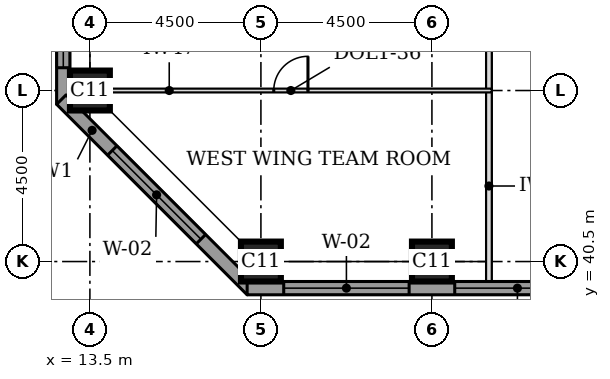
"""IFC4 building model, lengths in metres.
Left out: names, types, materials, properties, quantities, classifications, styles, units other than length and angle.
Written with IfcOpenShell. Run it as: python <this file> out.ifc"""

import sys

from ifc_helpers import new_model, si_unit, direction, frame, frame_2d, origin, origin_2d, place, context, subcontext, project, spatial, rectangle, extrude, element, fill, save


model = new_model("IFC4")
c1 = context("Model", 3, precision=1e-05, world=origin(), true_north=direction((0.0, 1.0)))
c2 = subcontext(c1, "Body", "Model", "MODEL_VIEW")
j1 = project(units=[si_unit("LENGTHUNIT", "METRE"), si_unit("PLANEANGLEUNIT", "RADIAN")], contexts=[c1])
p1 = place(None, origin())
s1 = spatial("IfcSite", under=j1, at=p1, CompositionType="ELEMENT")
p2 = place(p1, origin())
s2 = spatial("IfcBuilding", under=s1, at=p2, CompositionType="ELEMENT")
p3 = place(p2, frame((0.0, 0.0, 78.9)))
s3 = spatial("IfcBuildingStorey", under=s2, at=p3, CompositionType="ELEMENT", Elevation=78.9)
for number, where, z_axis, x_axis in (
    (1, (18.0, 40.5, 0.0), (0.0, 0.0, 1.0), (1.0, 0.0, 0.0)),
    (2, (22.5, 40.5, 0.0), (0.0, 0.0, 1.0), (1.0, 0.0, 0.0)),
    (3, (13.5, 45.0, 0.0), (0.0, 0.0, 1.0), (1.0, 0.0, 0.0)),
):
    element("IfcColumn", number, at=place(p3, frame(where, z_axis=z_axis, x_axis=x_axis)), inside=s3, PredefinedType="COLUMN", context=c2, shape_type="SweptSolid", body=[
        extrude(rectangle(XDim=1.05, YDim=1.05, at=origin_2d()), origin(), (0.0, 0.0, 1.0), 3.7),
    ])
p4 = place(p3, frame((12.8, 58.862, 0.0), z_axis=(0.0, 0.0, 1.0), x_axis=(0.0, -1.0, 0.0)))
e4 = element("IfcWall", 4, at=p4, inside=s3, PredefinedType="STANDARD", context=c2, shape_type="SweptSolid", body=[
    extrude(rectangle(XDim=14.225, YDim=0.35, at=frame_2d((7.112, 0.0))), origin(), (0.0, 0.0, 1.0), 3.525),
])
p5 = place(p4, frame((0.962, 0.0, 0.9)))
e5 = element("IfcOpeningElement", 5, at=p5, cuts=e4, PredefinedType="OPENING", context=c2, shape_type="SweptSolid", body=[
    extrude(rectangle(XDim=3.3, YDim=1.9, at=frame_2d((1.65, 0.95))), frame((0.0, 0.185, 0.0), z_axis=(0.0, -1.0, 0.0), x_axis=(1.0, 0.0, 0.0)), (0.0, 0.0, 1.0), 0.37),
])
p6 = place(p4, frame((5.462, 0.0, 0.9)))
e6 = element("IfcOpeningElement", 6, at=p6, cuts=e4, PredefinedType="OPENING", context=c2, shape_type="SweptSolid", body=[
    extrude(rectangle(XDim=3.3, YDim=1.9, at=frame_2d((1.65, 0.95))), frame((0.0, 0.185, 0.0), z_axis=(0.0, -1.0, 0.0), x_axis=(1.0, 0.0, 0.0)), (0.0, 0.0, 1.0), 0.37),
])
p7 = place(p4, frame((9.962, 0.0, 0.9)))
e7 = element("IfcOpeningElement", 7, at=p7, cuts=e4, PredefinedType="OPENING", context=c2, shape_type="SweptSolid", body=[
    extrude(rectangle(XDim=3.3, YDim=1.9, at=frame_2d((1.65, 0.95))), frame((0.0, 0.185, 0.0), z_axis=(0.0, -1.0, 0.0), x_axis=(1.0, 0.0, 0.0)), (0.0, 0.0, 1.0), 0.37),
])
p8 = place(p3, frame((12.749, 44.761, 0.0), z_axis=(0.0, 0.0, 1.0), x_axis=(0.707106781187, -0.707106781187, 0.0)))
e8 = element("IfcWall", 8, at=p8, inside=s3, PredefinedType="STANDARD", context=c2, shape_type="SweptSolid", body=[
    extrude(rectangle(XDim=7.089, YDim=0.35, at=frame_2d((3.544, 0.0))), origin(), (0.0, 0.0, 1.0), 3.525),
])
p9 = place(p8, frame((1.894, 0.0, 0.9)))
e9 = element("IfcOpeningElement", 9, at=p9, cuts=e8, PredefinedType="OPENING", context=c2, shape_type="SweptSolid", body=[
    extrude(rectangle(XDim=3.3, YDim=1.9, at=frame_2d((1.65, 0.95))), frame((0.0, 0.185, 0.0), z_axis=(0.0, -1.0, 0.0), x_axis=(1.0, 0.0, 0.0)), (0.0, 0.0, 1.0), 0.37),
])
p10 = place(p3, frame((17.638, 39.8, 0.0), z_axis=(0.0, 0.0, 1.0), x_axis=(1.0, 0.0, 0.0)))
e10 = element("IfcWall", 10, at=p10, inside=s3, PredefinedType="STANDARD", context=c2, shape_type="SweptSolid", body=[
    extrude(rectangle(XDim=17.837, YDim=0.35, at=frame_2d((8.919, 0.0))), origin(), (0.0, 0.0, 1.0), 3.525),
])
p11 = place(p10, frame((0.962, 0.0, 0.9)))
e11 = element("IfcOpeningElement", 11, at=p11, cuts=e10, PredefinedType="OPENING", context=c2, shape_type="SweptSolid", body=[
    extrude(rectangle(XDim=3.3, YDim=1.9, at=frame_2d((1.65, 0.95))), frame((0.0, 0.185, 0.0), z_axis=(0.0, -1.0, 0.0), x_axis=(1.0, 0.0, 0.0)), (0.0, 0.0, 1.0), 0.37),
])
p12 = place(p10, frame((5.462, 0.0, 0.9)))
e12 = element("IfcOpeningElement", 12, at=p12, cuts=e10, PredefinedType="OPENING", context=c2, shape_type="SweptSolid", body=[
    extrude(rectangle(XDim=3.3, YDim=1.9, at=frame_2d((1.65, 0.95))), frame((0.0, 0.185, 0.0), z_axis=(0.0, -1.0, 0.0), x_axis=(1.0, 0.0, 0.0)), (0.0, 0.0, 1.0), 0.37),
])
p13 = place(p10, frame((9.962, 0.0, 0.9)))
e13 = element("IfcOpeningElement", 13, at=p13, cuts=e10, PredefinedType="OPENING", context=c2, shape_type="SweptSolid", body=[
    extrude(rectangle(XDim=3.3, YDim=1.9, at=frame_2d((1.65, 0.95))), frame((0.0, 0.185, 0.0), z_axis=(0.0, -1.0, 0.0), x_axis=(1.0, 0.0, 0.0)), (0.0, 0.0, 1.0), 0.37),
])
p14 = place(p10, frame((14.037, 0.0, 0.9)))
e14 = element("IfcOpeningElement", 14, at=p14, cuts=e10, PredefinedType="OPENING", context=c2, shape_type="SweptSolid", body=[
    extrude(rectangle(XDim=3.3, YDim=1.9, at=frame_2d((1.65, 0.95))), frame((0.0, 0.185, 0.0), z_axis=(0.0, -1.0, 0.0), x_axis=(1.0, 0.0, 0.0)), (0.0, 0.0, 1.0), 0.37),
])
p15 = place(p3, frame((24.0, 39.975, 0.0), z_axis=(0.0, 0.0, 1.0), x_axis=(0.0, 1.0, 0.0)))
e15 = element("IfcWall", 15, at=p15, inside=s3, PredefinedType="PARTITIONING", context=c2, shape_type="SweptSolid", body=[
    extrude(rectangle(XDim=5.025, YDim=0.15, at=frame_2d((2.512, 0.0))), origin(), (0.0, 0.0, 1.0), 3.55),
])
p16 = place(p3, frame((24.0, 45.0, 0.0), z_axis=(0.0, 0.0, 1.0), x_axis=(0.0, 1.0, 0.0)))
e16 = element("IfcWall", 16, at=p16, inside=s3, PredefinedType="PARTITIONING", context=c2, shape_type="SweptSolid", body=[
    extrude(rectangle(XDim=1.5, YDim=0.15, at=frame_2d((0.75, 0.0))), origin(), (0.0, 0.0, 1.0), 3.55),
])
p17 = place(p3, frame((24.075, 45.0, 0.0), z_axis=(0.0, 0.0, 1.0), x_axis=(-1.0, 0.0, 0.0)))
e17 = element("IfcWall", 17, at=p17, inside=s3, PredefinedType="PARTITIONING", context=c2, shape_type="SweptSolid", body=[
    extrude(rectangle(XDim=10.575, YDim=0.1, at=frame_2d((5.288, 0.0))), origin(), (0.0, 0.0, 1.0), 2.55),
])
p18 = place(p17, frame((4.837, 0.0, 0.0)))
e18 = element("IfcOpeningElement", 18, at=p18, cuts=e17, PredefinedType="OPENING", context=c2, shape_type="SweptSolid", body=[
    extrude(rectangle(XDim=0.9, YDim=2.1, at=frame_2d((0.45, 1.05))), frame((0.0, 0.06, 0.0), z_axis=(0.0, -1.0, 0.0), x_axis=(1.0, 0.0, 0.0)), (0.0, 0.0, 1.0), 0.12),
])
p19 = place(p7, origin())
e19 = element("IfcWindow", 19, at=p19, inside=s3, PartitioningType="SINGLE_PANEL", PredefinedType="WINDOW", context=c2, shape_type="SweptSolid", body=[
    extrude(rectangle(XDim=3.3, YDim=1.9, at=frame_2d((1.65, 0.95))), frame((0.0, 0.085, 0.0), z_axis=(0.0, -1.0, 0.0), x_axis=(1.0, 0.0, 0.0)), (0.0, 0.0, 1.0), 0.06),
])
fill(e7, e19)
p20 = place(p9, origin())
e20 = element("IfcWindow", 20, at=p20, inside=s3, PartitioningType="SINGLE_PANEL", PredefinedType="WINDOW", context=c2, shape_type="SweptSolid", body=[
    extrude(rectangle(XDim=3.3, YDim=1.9, at=frame_2d((1.65, 0.95))), frame((0.0, 0.085, 0.0), z_axis=(0.0, -1.0, 0.0), x_axis=(1.0, 0.0, 0.0)), (0.0, 0.0, 1.0), 0.06),
])
fill(e9, e20)
p21 = place(p11, origin())
e21 = element("IfcWindow", 21, at=p21, inside=s3, PartitioningType="SINGLE_PANEL", PredefinedType="WINDOW", context=c2, shape_type="SweptSolid", body=[
    extrude(rectangle(XDim=3.3, YDim=1.9, at=frame_2d((1.65, 0.95))), frame((0.0, 0.085, 0.0), z_axis=(0.0, -1.0, 0.0), x_axis=(1.0, 0.0, 0.0)), (0.0, 0.0, 1.0), 0.06),
])
fill(e11, e21)
p22 = place(p12, origin())
e22 = element("IfcWindow", 22, at=p22, inside=s3, PartitioningType="SINGLE_PANEL", PredefinedType="WINDOW", context=c2, shape_type="SweptSolid", body=[
    extrude(rectangle(XDim=3.3, YDim=1.9, at=frame_2d((1.65, 0.95))), frame((0.0, 0.085, 0.0), z_axis=(0.0, -1.0, 0.0), x_axis=(1.0, 0.0, 0.0)), (0.0, 0.0, 1.0), 0.06),
])
fill(e12, e22)
p23 = place(p18, frame((0.9, 0.0, 0.0), z_axis=(0.0, 0.0, 1.0), x_axis=(-1.0, 0.0, 0.0)))
e23 = element("IfcDoor", 23, at=p23, inside=s3, OperationType="SINGLE_SWING_RIGHT", PredefinedType="DOOR", context=c2, shape_type="SweptSolid", body=[
    extrude(rectangle(XDim=0.9, YDim=2.1, at=frame_2d((0.45, 1.05))), frame((0.0, 0.025, 0.0), z_axis=(0.0, -1.0, 0.0), x_axis=(1.0, 0.0, 0.0)), (0.0, 0.0, 1.0), 0.05),
])
fill(e18, e23)
save(model, sys.argv[1])
